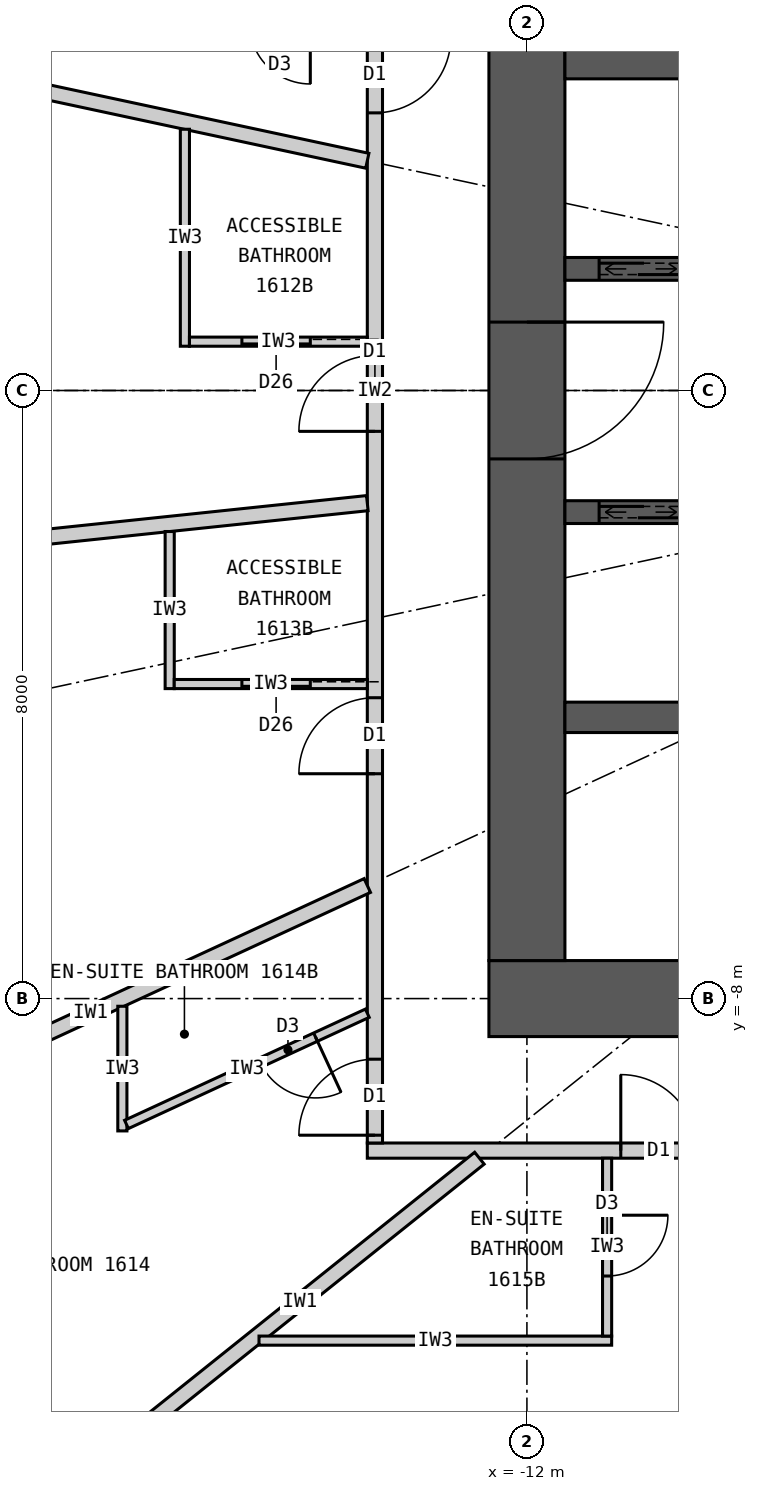
"""IFC4 building model, lengths in metres.
Left out: names, types, materials, properties, quantities, classifications, styles, units other than length and angle.
Written with IfcOpenShell. Run it as: python <this file> out.ifc"""

import sys

from ifc_helpers import new_model, si_unit, direction, frame, frame_2d, origin, place, context, subcontext, project, spatial, rectangle, extrude, element, fill, save


model = new_model("IFC4")
c1 = context("Model", 3, precision=1e-05, world=origin(), true_north=direction((0.0, 1.0)))
c2 = subcontext(c1, "Body", "Model", "MODEL_VIEW")
j1 = project(units=[si_unit("LENGTHUNIT", "METRE"), si_unit("PLANEANGLEUNIT", "RADIAN")], contexts=[c1])
p1 = place(None, origin())
s1 = spatial("IfcSite", under=j1, at=p1, CompositionType="ELEMENT")
p2 = place(p1, origin())
s2 = spatial("IfcBuilding", under=s1, at=p2, CompositionType="ELEMENT")
p3 = place(p2, frame((0.0, 0.0, 67.2)))
s3 = spatial("IfcBuildingStorey", under=s2, at=p3, CompositionType="ELEMENT", Elevation=67.2)
p4 = place(p3, frame((12.5, -8.0, 0.0), z_axis=(0.0, 0.0, 1.0), x_axis=(-1.0, 0.0, 0.0)))
e1 = element("IfcWall", 1, at=p4, inside=s3, PredefinedType="SHEAR", context=c2, shape_type="SweptSolid", body=[
    extrude(rectangle(XDim=25.0, YDim=1.0, at=frame_2d((12.5, 0.0))), origin(), (0.0, 0.0, 1.0), 3.3),
])
p5 = place(p4, frame((11.2, 0.0, 0.0)))
e2 = element("IfcOpeningElement", 2, at=p5, cuts=e1, PredefinedType="OPENING", context=c2, shape_type="SweptSolid", body=[
    extrude(rectangle(XDim=1.2, YDim=2.2, at=frame_2d((0.6, 1.1))), frame((0.0, 0.51, 0.0), z_axis=(0.0, -1.0, 0.0), x_axis=(1.0, 0.0, 0.0)), (0.0, 0.0, 1.0), 1.02),
])
p6 = place(p4, frame((18.8, 0.0, 0.0)))
e3 = element("IfcOpeningElement", 3, at=p6, cuts=e1, PredefinedType="OPENING", context=c2, shape_type="SweptSolid", body=[
    extrude(rectangle(XDim=0.9, YDim=2.2, at=frame_2d((0.45, 1.1))), frame((0.0, 0.51, 0.0), z_axis=(0.0, -1.0, 0.0), x_axis=(1.0, 0.0, 0.0)), (0.0, 0.0, 1.0), 1.02),
])
p7 = place(p3, frame((-12.0, 7.5, 0.0), z_axis=(0.0, 0.0, 1.0), x_axis=(0.0, -1.0, 0.0)))
e4 = element("IfcWall", 4, at=p7, inside=s3, PredefinedType="SHEAR", context=c2, shape_type="SweptSolid", body=[
    extrude(rectangle(XDim=15.0, YDim=1.0, at=frame_2d((7.5, 0.0))), origin(), (0.0, 0.0, 1.0), 3.3),
])
p8 = place(p7, frame((6.6, 0.0, 0.0)))
e5 = element("IfcOpeningElement", 5, at=p8, cuts=e4, PredefinedType="OPENING", context=c2, shape_type="SweptSolid", body=[
    extrude(rectangle(XDim=1.8, YDim=2.2, at=frame_2d((0.9, 1.1))), frame((0.0, 0.51, 0.0), z_axis=(0.0, -1.0, 0.0), x_axis=(1.0, 0.0, 0.0)), (0.0, 0.0, 1.0), 1.02),
])
p9 = place(p3, frame((-11.5, 4.3, 0.0), z_axis=(0.0, 0.0, 1.0), x_axis=(1.0, 0.0, 0.0)))
e6 = element("IfcWall", 6, at=p9, inside=s3, PredefinedType="SHEAR", context=c2, shape_type="SweptSolid", body=[
    extrude(rectangle(XDim=23.0, YDim=0.4, at=frame_2d((11.5, 0.0))), origin(), (0.0, 0.0, 1.0), 3.3),
])
p10 = place(p3, frame((-11.5, 1.6, 0.0), z_axis=(0.0, 0.0, 1.0), x_axis=(1.0, 0.0, 0.0)))
e7 = element("IfcWall", 7, at=p10, inside=s3, PredefinedType="SHEAR", context=c2, shape_type="SweptSolid", body=[
    extrude(rectangle(XDim=23.0, YDim=0.3, at=frame_2d((11.5, 0.0))), origin(), (0.0, 0.0, 1.0), 3.3),
])
p11 = place(p10, frame((0.45, 0.0, 0.0)))
e8 = element("IfcOpeningElement", 8, at=p11, cuts=e7, PredefinedType="OPENING", context=c2, shape_type="SweptSolid", body=[
    extrude(rectangle(XDim=1.1, YDim=2.2, at=frame_2d((0.55, 1.1))), frame((0.0, 0.16, 0.0), z_axis=(0.0, -1.0, 0.0), x_axis=(1.0, 0.0, 0.0)), (0.0, 0.0, 1.0), 0.32),
])
p12 = place(p10, frame((3.45, 0.0, 0.0)))
e9 = element("IfcOpeningElement", 9, at=p12, cuts=e7, PredefinedType="OPENING", context=c2, shape_type="SweptSolid", body=[
    extrude(rectangle(XDim=1.1, YDim=2.2, at=frame_2d((0.55, 1.1))), frame((0.0, 0.16, 0.0), z_axis=(0.0, -1.0, 0.0), x_axis=(1.0, 0.0, 0.0)), (0.0, 0.0, 1.0), 0.32),
])
p13 = place(p10, frame((6.55, 0.0, 0.0)))
e10 = element("IfcOpeningElement", 10, at=p13, cuts=e7, PredefinedType="OPENING", context=c2, shape_type="SweptSolid", body=[
    extrude(rectangle(XDim=0.9, YDim=2.2, at=frame_2d((0.45, 1.1))), frame((0.0, 0.16, 0.0), z_axis=(0.0, -1.0, 0.0), x_axis=(1.0, 0.0, 0.0)), (0.0, 0.0, 1.0), 0.32),
])
p14 = place(p10, frame((12.55, 0.0, 0.0)))
e11 = element("IfcOpeningElement", 11, at=p14, cuts=e7, PredefinedType="OPENING", context=c2, shape_type="SweptSolid", body=[
    extrude(rectangle(XDim=0.9, YDim=2.2, at=frame_2d((0.45, 1.1))), frame((0.0, 0.16, 0.0), z_axis=(0.0, -1.0, 0.0), x_axis=(1.0, 0.0, 0.0)), (0.0, 0.0, 1.0), 0.32),
])
p15 = place(p3, frame((-11.5, -4.3, 0.0), z_axis=(0.0, 0.0, 1.0), x_axis=(1.0, 0.0, 0.0)))
e12 = element("IfcWall", 12, at=p15, inside=s3, PredefinedType="SHEAR", context=c2, shape_type="SweptSolid", body=[
    extrude(rectangle(XDim=23.0, YDim=0.4, at=frame_2d((11.5, 0.0))), origin(), (0.0, 0.0, 1.0), 3.3),
])
p16 = place(p3, frame((-11.5, -1.6, 0.0), z_axis=(0.0, 0.0, 1.0), x_axis=(1.0, 0.0, 0.0)))
e13 = element("IfcWall", 13, at=p16, inside=s3, PredefinedType="SHEAR", context=c2, shape_type="SweptSolid", body=[
    extrude(rectangle(XDim=23.0, YDim=0.3, at=frame_2d((11.5, 0.0))), origin(), (0.0, 0.0, 1.0), 3.3),
])
p17 = place(p16, frame((0.45, 0.0, 0.0)))
e14 = element("IfcOpeningElement", 14, at=p17, cuts=e13, PredefinedType="OPENING", context=c2, shape_type="SweptSolid", body=[
    extrude(rectangle(XDim=1.1, YDim=2.2, at=frame_2d((0.55, 1.1))), frame((0.0, 0.16, 0.0), z_axis=(0.0, -1.0, 0.0), x_axis=(1.0, 0.0, 0.0)), (0.0, 0.0, 1.0), 0.32),
])
p18 = place(p16, frame((3.45, 0.0, 0.0)))
e15 = element("IfcOpeningElement", 15, at=p18, cuts=e13, PredefinedType="OPENING", context=c2, shape_type="SweptSolid", body=[
    extrude(rectangle(XDim=1.1, YDim=2.2, at=frame_2d((0.55, 1.1))), frame((0.0, 0.16, 0.0), z_axis=(0.0, -1.0, 0.0), x_axis=(1.0, 0.0, 0.0)), (0.0, 0.0, 1.0), 0.32),
])
p19 = place(p16, frame((15.2, 0.0, 0.0)))
e16 = element("IfcOpeningElement", 16, at=p19, cuts=e13, PredefinedType="OPENING", context=c2, shape_type="SweptSolid", body=[
    extrude(rectangle(XDim=1.6, YDim=2.4, at=frame_2d((0.8, 1.2))), frame((0.0, 0.16, 0.0), z_axis=(0.0, -1.0, 0.0), x_axis=(1.0, 0.0, 0.0)), (0.0, 0.0, 1.0), 0.32),
])
p20 = place(p16, frame((8.05, 0.0, 0.0)))
e17 = element("IfcOpeningElement", 17, at=p20, cuts=e13, PredefinedType="OPENING", context=c2, shape_type="SweptSolid", body=[
    extrude(rectangle(XDim=0.9, YDim=2.2, at=frame_2d((0.45, 1.1))), frame((0.0, 0.16, 0.0), z_axis=(0.0, -1.0, 0.0), x_axis=(1.0, 0.0, 0.0)), (0.0, 0.0, 1.0), 0.32),
])
p21 = place(p16, frame((12.55, 0.0, 0.0)))
e18 = element("IfcOpeningElement", 18, at=p21, cuts=e13, PredefinedType="OPENING", context=c2, shape_type="SweptSolid", body=[
    extrude(rectangle(XDim=0.9, YDim=2.2, at=frame_2d((0.45, 1.1))), frame((0.0, 0.16, 0.0), z_axis=(0.0, -1.0, 0.0), x_axis=(1.0, 0.0, 0.0)), (0.0, 0.0, 1.0), 0.32),
])
p22 = place(p3, frame((14.1, -10.0, 0.0), z_axis=(0.0, 0.0, 1.0), x_axis=(-1.0, 0.0, 0.0)))
e19 = element("IfcWall", 19, at=p22, inside=s3, PredefinedType="PARTITIONING", context=c2, shape_type="SweptSolid", body=[
    extrude(rectangle(XDim=28.2, YDim=0.2, at=frame_2d((14.1, 0.0))), origin(), (0.0, 0.0, 1.0), 3.12),
])
p23 = place(p22, frame((23.865, 0.0, 0.0)))
e20 = element("IfcOpeningElement", 20, at=p23, cuts=e19, PredefinedType="OPENING", context=c2, shape_type="SweptSolid", body=[
    extrude(rectangle(XDim=1.0, YDim=2.2, at=frame_2d((0.5, 1.1))), frame((0.0, 0.11, 0.0), z_axis=(0.0, -1.0, 0.0), x_axis=(1.0, 0.0, 0.0)), (0.0, 0.0, 1.0), 0.22),
])
p24 = place(p22, frame((18.529, 0.0, 0.0)))
e21 = element("IfcOpeningElement", 21, at=p24, cuts=e19, PredefinedType="OPENING", context=c2, shape_type="SweptSolid", body=[
    extrude(rectangle(XDim=1.0, YDim=2.2, at=frame_2d((0.5, 1.1))), frame((0.0, 0.11, 0.0), z_axis=(0.0, -1.0, 0.0), x_axis=(1.0, 0.0, 0.0)), (0.0, 0.0, 1.0), 0.22),
])
p25 = place(p22, frame((14.623, 0.0, 0.0)))
e22 = element("IfcOpeningElement", 22, at=p25, cuts=e19, PredefinedType="OPENING", context=c2, shape_type="SweptSolid", body=[
    extrude(rectangle(XDim=1.0, YDim=2.2, at=frame_2d((0.5, 1.1))), frame((0.0, 0.11, 0.0), z_axis=(0.0, -1.0, 0.0), x_axis=(1.0, 0.0, 0.0)), (0.0, 0.0, 1.0), 0.22),
])
p26 = place(p22, frame((11.24, 0.0, 0.0)))
e23 = element("IfcOpeningElement", 23, at=p26, cuts=e19, PredefinedType="OPENING", context=c2, shape_type="SweptSolid", body=[
    extrude(rectangle(XDim=1.0, YDim=2.2, at=frame_2d((0.5, 1.1))), frame((0.0, 0.11, 0.0), z_axis=(0.0, -1.0, 0.0), x_axis=(1.0, 0.0, 0.0)), (0.0, 0.0, 1.0), 0.22),
])
p27 = place(p22, frame((8.671, 0.0, 0.0)))
e24 = element("IfcOpeningElement", 24, at=p27, cuts=e19, PredefinedType="OPENING", context=c2, shape_type="SweptSolid", body=[
    extrude(rectangle(XDim=1.0, YDim=2.2, at=frame_2d((0.5, 1.1))), frame((0.0, 0.11, 0.0), z_axis=(0.0, -1.0, 0.0), x_axis=(1.0, 0.0, 0.0)), (0.0, 0.0, 1.0), 0.22),
])
p28 = place(p22, frame((2.801, 0.0, 0.0)))
e25 = element("IfcOpeningElement", 25, at=p28, cuts=e19, PredefinedType="OPENING", context=c2, shape_type="SweptSolid", body=[
    extrude(rectangle(XDim=1.0, YDim=2.2, at=frame_2d((0.5, 1.1))), frame((0.0, 0.11, 0.0), z_axis=(0.0, -1.0, 0.0), x_axis=(1.0, 0.0, 0.0)), (0.0, 0.0, 1.0), 0.22),
])
p29 = place(p3, frame((-14.0, 9.9, 0.0), z_axis=(0.0, 0.0, 1.0), x_axis=(0.0, -1.0, 0.0)))
e26 = element("IfcWall", 26, at=p29, inside=s3, PredefinedType="PARTITIONING", context=c2, shape_type="SweptSolid", body=[
    extrude(rectangle(XDim=19.8, YDim=0.2, at=frame_2d((9.9, 0.0))), origin(), (0.0, 0.0, 1.0), 3.12),
])
p30 = place(p29, frame((0.103, 0.0, 0.0)))
e27 = element("IfcOpeningElement", 27, at=p30, cuts=e26, PredefinedType="OPENING", context=c2, shape_type="SweptSolid", body=[
    extrude(rectangle(XDim=1.0, YDim=2.2, at=frame_2d((0.5, 1.1))), frame((0.0, 0.11, 0.0), z_axis=(0.0, -1.0, 0.0), x_axis=(1.0, 0.0, 0.0)), (0.0, 0.0, 1.0), 0.22),
])
p31 = place(p29, frame((5.248, 0.0, 0.0)))
e28 = element("IfcOpeningElement", 28, at=p31, cuts=e26, PredefinedType="OPENING", context=c2, shape_type="SweptSolid", body=[
    extrude(rectangle(XDim=1.0, YDim=2.2, at=frame_2d((0.5, 1.1))), frame((0.0, 0.11, 0.0), z_axis=(0.0, -1.0, 0.0), x_axis=(1.0, 0.0, 0.0)), (0.0, 0.0, 1.0), 0.22),
])
p32 = place(p29, frame((9.438, 0.0, 0.0)))
e29 = element("IfcOpeningElement", 29, at=p32, cuts=e26, PredefinedType="OPENING", context=c2, shape_type="SweptSolid", body=[
    extrude(rectangle(XDim=1.0, YDim=2.2, at=frame_2d((0.5, 1.1))), frame((0.0, 0.11, 0.0), z_axis=(0.0, -1.0, 0.0), x_axis=(1.0, 0.0, 0.0)), (0.0, 0.0, 1.0), 0.22),
])
p33 = place(p29, frame((13.942, 0.0, 0.0)))
e30 = element("IfcOpeningElement", 30, at=p33, cuts=e26, PredefinedType="OPENING", context=c2, shape_type="SweptSolid", body=[
    extrude(rectangle(XDim=1.0, YDim=2.2, at=frame_2d((0.5, 1.1))), frame((0.0, 0.11, 0.0), z_axis=(0.0, -1.0, 0.0), x_axis=(1.0, 0.0, 0.0)), (0.0, 0.0, 1.0), 0.22),
])
p34 = place(p29, frame((18.698, 0.0, 0.0)))
e31 = element("IfcOpeningElement", 31, at=p34, cuts=e26, PredefinedType="OPENING", context=c2, shape_type="SweptSolid", body=[
    extrude(rectangle(XDim=1.0, YDim=2.2, at=frame_2d((0.5, 1.1))), frame((0.0, 0.11, 0.0), z_axis=(0.0, -1.0, 0.0), x_axis=(1.0, 0.0, 0.0)), (0.0, 0.0, 1.0), 0.22),
])
p35 = place(p3, frame((-14.1, 3.022, 0.0), z_axis=(0.0, 0.0, 1.0), x_axis=(-0.977790014929, 0.209586943072, 0.0)))
e32 = element("IfcWall", 32, at=p35, inside=s3, PredefinedType="PARTITIONING", context=c2, shape_type="SweptSolid", body=[
    extrude(rectangle(XDim=10.087, YDim=0.2, at=frame_2d((5.043, 0.0))), origin(), (0.0, 0.0, 1.0), 2.32),
])
p36 = place(p3, frame((-14.1, -1.482, 0.0), z_axis=(0.0, 0.0, 1.0), x_axis=(-0.994522076235, -0.104526742422, 0.0)))
e33 = element("IfcWall", 33, at=p36, inside=s3, PredefinedType="PARTITIONING", context=c2, shape_type="SweptSolid", body=[
    extrude(rectangle(XDim=11.821, YDim=0.2, at=frame_2d((5.91, 0.0))), origin(), (0.0, 0.0, 1.0), 2.32),
])
p37 = place(p3, frame((-14.1, -6.512, 0.0), z_axis=(0.0, 0.0, 1.0), x_axis=(-0.907832871056, -0.419332181247, 0.0)))
e34 = element("IfcWall", 34, at=p37, inside=s3, PredefinedType="PARTITIONING", context=c2, shape_type="SweptSolid", body=[
    extrude(rectangle(XDim=8.023, YDim=0.2, at=frame_2d((4.011, 0.0))), origin(), (0.0, 0.0, 1.0), 2.32),
])
p38 = place(p3, frame((-12.625, -10.1, 0.0), z_axis=(0.0, 0.0, 1.0), x_axis=(-0.780892451574, -0.624665493744, 0.0)))
e35 = element("IfcWall", 35, at=p38, inside=s3, PredefinedType="PARTITIONING", context=c2, shape_type="SweptSolid", body=[
    extrude(rectangle(XDim=6.045, YDim=0.2, at=frame_2d((3.022, 0.0))), origin(), (0.0, 0.0, 1.0), 2.32),
])
p39 = place(p3, frame((-7.289, -10.1, 0.0), z_axis=(0.0, 0.0, 1.0), x_axis=(-0.585198353053, -0.810890182197, 0.0)))
e36 = element("IfcWall", 36, at=p39, inside=s3, PredefinedType="PARTITIONING", context=c2, shape_type="SweptSolid", body=[
    extrude(rectangle(XDim=8.36, YDim=0.2, at=frame_2d((4.18, 0.0))), origin(), (0.0, 0.0, 1.0), 2.32),
])
p40 = place(p3, frame((-16.5, 3.437, 0.0), z_axis=(0.0, 0.0, 1.0), x_axis=(0.0, -1.0, 0.0)))
e37 = element("IfcWall", 37, at=p40, inside=s3, PredefinedType="PARTITIONING", context=c2, shape_type="SweptSolid", body=[
    extrude(rectangle(XDim=2.854, YDim=0.12, at=frame_2d((1.427, 0.0))), origin(), (0.0, 0.0, 1.0), 3.12),
])
p41 = place(p3, frame((-14.1, 0.643, 0.0), z_axis=(0.0, 0.0, 1.0), x_axis=(-1.0, 0.0, 0.0)))
e38 = element("IfcWall", 38, at=p41, inside=s3, PredefinedType="PARTITIONING", context=c2, shape_type="SweptSolid", body=[
    extrude(rectangle(XDim=2.34, YDim=0.12, at=frame_2d((1.17, 0.0))), origin(), (0.0, 0.0, 1.0), 3.12),
])
p42 = place(p41, frame((0.75, 0.0, 0.0)))
e39 = element("IfcOpeningElement", 39, at=p42, cuts=e38, PredefinedType="OPENING", context=c2, shape_type="SweptSolid", body=[
    extrude(rectangle(XDim=0.9, YDim=2.1, at=frame_2d((0.45, 1.05))), frame((0.0, 0.07, 0.0), z_axis=(0.0, -1.0, 0.0), x_axis=(1.0, 0.0, 0.0)), (0.0, 0.0, 1.0), 0.14),
])
p43 = place(p3, frame((-16.7, -1.855, 0.0), z_axis=(0.0, 0.0, 1.0), x_axis=(0.0, -1.0, 0.0)))
e40 = element("IfcWall", 40, at=p43, inside=s3, PredefinedType="PARTITIONING", context=c2, shape_type="SweptSolid", body=[
    extrude(rectangle(XDim=2.067, YDim=0.12, at=frame_2d((1.033, 0.0))), origin(), (0.0, 0.0, 1.0), 3.12),
])
p44 = place(p3, frame((-14.1, -3.862, 0.0), z_axis=(0.0, 0.0, 1.0), x_axis=(-1.0, 0.0, 0.0)))
e41 = element("IfcWall", 41, at=p44, inside=s3, PredefinedType="PARTITIONING", context=c2, shape_type="SweptSolid", body=[
    extrude(rectangle(XDim=2.54, YDim=0.12, at=frame_2d((1.27, 0.0))), origin(), (0.0, 0.0, 1.0), 2.32),
])
p45 = place(p44, frame((0.75, 0.0, 0.0)))
e42 = element("IfcOpeningElement", 42, at=p45, cuts=e41, PredefinedType="OPENING", context=c2, shape_type="SweptSolid", body=[
    extrude(rectangle(XDim=0.9, YDim=2.1, at=frame_2d((0.45, 1.05))), frame((0.0, 0.07, 0.0), z_axis=(0.0, -1.0, 0.0), x_axis=(1.0, 0.0, 0.0)), (0.0, 0.0, 1.0), 0.14),
])
p46 = place(p3, frame((-17.323, -8.101, 0.0), z_axis=(0.0, 0.0, 1.0), x_axis=(0.0, -1.0, 0.0)))
e43 = element("IfcWall", 43, at=p46, inside=s3, PredefinedType="PARTITIONING", context=c2, shape_type="SweptSolid", body=[
    extrude(rectangle(XDim=1.64, YDim=0.12, at=frame_2d((0.82, 0.0))), origin(), (0.0, 0.0, 1.0), 3.12),
])
p47 = place(p3, frame((-14.1, -8.193, 0.0), z_axis=(0.0, 0.0, 1.0), x_axis=(-0.907836493557, -0.419324338628, 0.0)))
e44 = element("IfcWall", 44, at=p47, inside=s3, PredefinedType="PARTITIONING", context=c2, shape_type="SweptSolid", body=[
    extrude(rectangle(XDim=3.49, YDim=0.12, at=frame_2d((1.745, 0.0))), origin(), (0.0, 0.0, 1.0), 3.12),
])
p48 = place(p47, frame((0.75, 0.0, 0.0)))
e45 = element("IfcOpeningElement", 45, at=p48, cuts=e44, PredefinedType="OPENING", context=c2, shape_type="SweptSolid", body=[
    extrude(rectangle(XDim=0.8, YDim=2.1, at=frame_2d((0.4, 1.05))), frame((0.0, 0.07, 0.0), z_axis=(0.0, -1.0, 0.0), x_axis=(1.0, 0.0, 0.0)), (0.0, 0.0, 1.0), 0.14),
])
p49 = place(p3, frame((-15.525, -12.5, 0.0), z_axis=(0.0, 0.0, 1.0), x_axis=(1.0, 0.0, 0.0)))
e46 = element("IfcWall", 46, at=p49, inside=s3, PredefinedType="PARTITIONING", context=c2, shape_type="SweptSolid", body=[
    extrude(rectangle(XDim=4.64, YDim=0.12, at=frame_2d((2.32, 0.0))), origin(), (0.0, 0.0, 1.0), 3.12),
])
p50 = place(p3, frame((-10.945, -10.1, 0.0), z_axis=(0.0, 0.0, 1.0), x_axis=(0.0, -1.0, 0.0)))
e47 = element("IfcWall", 47, at=p50, inside=s3, PredefinedType="PARTITIONING", context=c2, shape_type="SweptSolid", body=[
    extrude(rectangle(XDim=2.34, YDim=0.12, at=frame_2d((1.17, 0.0))), origin(), (0.0, 0.0, 1.0), 3.12),
])
p51 = place(p50, frame((0.75, 0.0, 0.0)))
e48 = element("IfcOpeningElement", 48, at=p51, cuts=e47, PredefinedType="OPENING", context=c2, shape_type="SweptSolid", body=[
    extrude(rectangle(XDim=0.8, YDim=2.1, at=frame_2d((0.4, 1.05))), frame((0.0, 0.07, 0.0), z_axis=(0.0, -1.0, 0.0), x_axis=(1.0, 0.0, 0.0)), (0.0, 0.0, 1.0), 0.14),
])
p52 = place(p31, origin())
e49 = element("IfcDoor", 49, at=p52, inside=s3, OperationType="SINGLE_SWING_LEFT", PredefinedType="DOOR", context=c2, shape_type="SweptSolid", body=[
    extrude(rectangle(XDim=1.0, YDim=2.2, at=frame_2d((0.5, 1.1))), frame((0.0, 0.025, 0.0), z_axis=(0.0, -1.0, 0.0), x_axis=(1.0, 0.0, 0.0)), (0.0, 0.0, 1.0), 0.05),
])
fill(e28, e49)
p53 = place(p42, origin())
e50 = element("IfcDoor", 50, at=p53, inside=s3, OperationType="SLIDING_TO_LEFT", PredefinedType="DOOR", context=c2, shape_type="SweptSolid", body=[
    extrude(rectangle(XDim=0.9, YDim=2.1, at=frame_2d((0.45, 1.05))), frame((0.0, 0.025, 0.0), z_axis=(0.0, -1.0, 0.0), x_axis=(1.0, 0.0, 0.0)), (0.0, 0.0, 1.0), 0.05),
])
fill(e39, e50)
p54 = place(p32, origin())
e51 = element("IfcDoor", 51, at=p54, inside=s3, OperationType="SINGLE_SWING_RIGHT", PredefinedType="DOOR", context=c2, shape_type="SweptSolid", body=[
    extrude(rectangle(XDim=1.0, YDim=2.2, at=frame_2d((0.5, 1.1))), frame((0.0, 0.025, 0.0), z_axis=(0.0, -1.0, 0.0), x_axis=(1.0, 0.0, 0.0)), (0.0, 0.0, 1.0), 0.05),
])
fill(e29, e51)
p55 = place(p45, origin())
e52 = element("IfcDoor", 52, at=p55, inside=s3, OperationType="SLIDING_TO_LEFT", PredefinedType="DOOR", context=c2, shape_type="SweptSolid", body=[
    extrude(rectangle(XDim=0.9, YDim=2.1, at=frame_2d((0.45, 1.05))), frame((0.0, 0.025, 0.0), z_axis=(0.0, -1.0, 0.0), x_axis=(1.0, 0.0, 0.0)), (0.0, 0.0, 1.0), 0.05),
])
fill(e42, e52)
p56 = place(p33, origin())
e53 = element("IfcDoor", 53, at=p56, inside=s3, OperationType="SINGLE_SWING_RIGHT", PredefinedType="DOOR", context=c2, shape_type="SweptSolid", body=[
    extrude(rectangle(XDim=1.0, YDim=2.2, at=frame_2d((0.5, 1.1))), frame((0.0, 0.025, 0.0), z_axis=(0.0, -1.0, 0.0), x_axis=(1.0, 0.0, 0.0)), (0.0, 0.0, 1.0), 0.05),
])
fill(e30, e53)
p57 = place(p48, origin())
e54 = element("IfcDoor", 54, at=p57, inside=s3, OperationType="SINGLE_SWING_LEFT", PredefinedType="DOOR", context=c2, shape_type="SweptSolid", body=[
    extrude(rectangle(XDim=0.8, YDim=2.1, at=frame_2d((0.4, 1.05))), frame((0.0, 0.025, 0.0), z_axis=(0.0, -1.0, 0.0), x_axis=(1.0, 0.0, 0.0)), (0.0, 0.0, 1.0), 0.05),
])
fill(e45, e54)
p58 = place(p34, origin())
e55 = element("IfcDoor", 55, at=p58, inside=s3, OperationType="SINGLE_SWING_RIGHT", PredefinedType="DOOR", context=c2, shape_type="SweptSolid", body=[
    extrude(rectangle(XDim=1.0, YDim=2.2, at=frame_2d((0.5, 1.1))), frame((0.0, 0.025, 0.0), z_axis=(0.0, -1.0, 0.0), x_axis=(1.0, 0.0, 0.0)), (0.0, 0.0, 1.0), 0.05),
])
fill(e31, e55)
p59 = place(p51, origin())
e56 = element("IfcDoor", 56, at=p59, inside=s3, OperationType="SINGLE_SWING_LEFT", PredefinedType="DOOR", context=c2, shape_type="SweptSolid", body=[
    extrude(rectangle(XDim=0.8, YDim=2.1, at=frame_2d((0.4, 1.05))), frame((0.0, 0.025, 0.0), z_axis=(0.0, -1.0, 0.0), x_axis=(1.0, 0.0, 0.0)), (0.0, 0.0, 1.0), 0.05),
])
fill(e48, e56)
p60 = place(p23, origin())
e57 = element("IfcDoor", 57, at=p60, inside=s3, OperationType="SINGLE_SWING_RIGHT", PredefinedType="DOOR", context=c2, shape_type="SweptSolid", body=[
    extrude(rectangle(XDim=1.0, YDim=2.2, at=frame_2d((0.5, 1.1))), frame((0.0, 0.025, 0.0), z_axis=(0.0, -1.0, 0.0), x_axis=(1.0, 0.0, 0.0)), (0.0, 0.0, 1.0), 0.05),
])
fill(e20, e57)
p61 = place(p11, origin())
e58 = element("IfcDoor", 58, at=p61, inside=s3, OperationType="DOUBLE_DOOR_SLIDING", PredefinedType="DOOR", context=c2, shape_type="SweptSolid", body=[
    extrude(rectangle(XDim=1.1, YDim=2.2, at=frame_2d((0.55, 1.1))), frame((0.0, 0.025, 0.0), z_axis=(0.0, -1.0, 0.0), x_axis=(1.0, 0.0, 0.0)), (0.0, 0.0, 1.0), 0.05),
])
fill(e8, e58)
p62 = place(p17, origin())
e59 = element("IfcDoor", 59, at=p62, inside=s3, OperationType="DOUBLE_DOOR_SLIDING", PredefinedType="DOOR", context=c2, shape_type="SweptSolid", body=[
    extrude(rectangle(XDim=1.1, YDim=2.2, at=frame_2d((0.55, 1.1))), frame((0.0, 0.025, 0.0), z_axis=(0.0, -1.0, 0.0), x_axis=(1.0, 0.0, 0.0)), (0.0, 0.0, 1.0), 0.05),
])
fill(e14, e59)
p63 = place(p8, origin())
e60 = element("IfcDoor", 60, at=p63, inside=s3, OperationType="DOUBLE_DOOR_DOUBLE_SWING", PredefinedType="DOOR", context=c2, shape_type="SweptSolid", body=[
    extrude(rectangle(XDim=1.8, YDim=2.2, at=frame_2d((0.9, 1.1))), frame((0.0, 0.025, 0.0), z_axis=(0.0, -1.0, 0.0), x_axis=(1.0, 0.0, 0.0)), (0.0, 0.0, 1.0), 0.05),
])
fill(e5, e60)
save(model, sys.argv[1])
